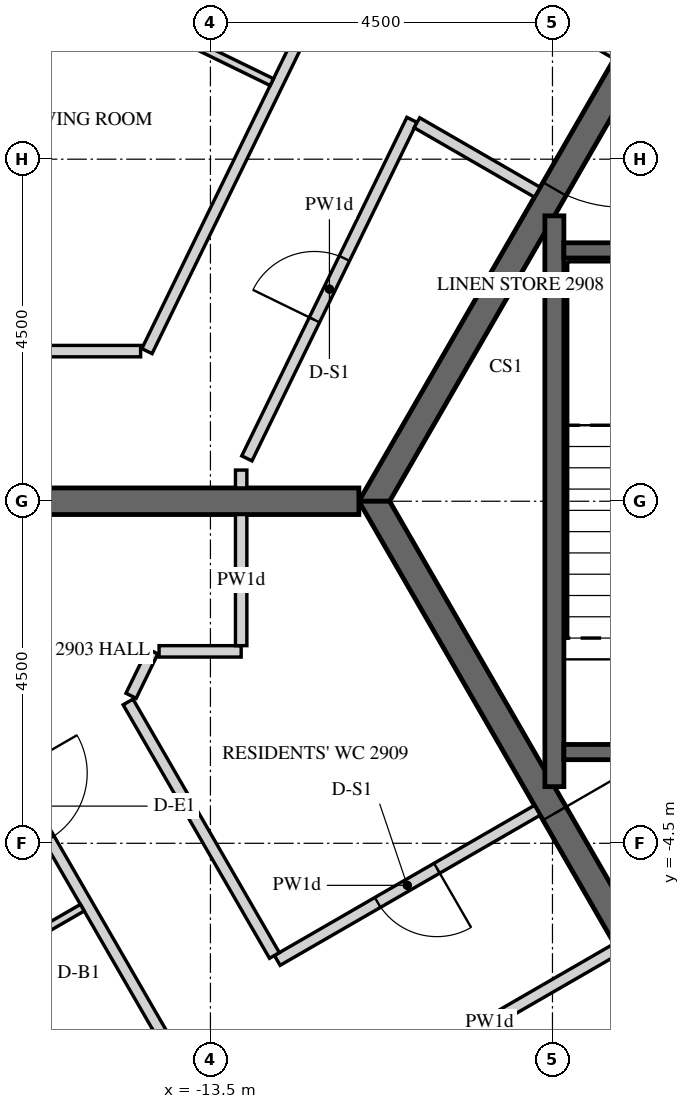
"""IFC4 building model, lengths in metres.
Left out: names, types, materials, properties, quantities, classifications, styles, units other than length and angle.
Written with IfcOpenShell. Run it as: python <this file> out.ifc"""

import sys

from ifc_helpers import new_model, si_unit, direction, frame, frame_2d, origin, place, context, subcontext, project, spatial, polyline, rectangle, outline, extrude, element, fill, save


model = new_model("IFC4")
c1 = context("Model", 3, precision=1e-05, world=origin(), true_north=direction((0.0, 1.0)))
c2 = subcontext(c1, "Body", "Model", "MODEL_VIEW")
j1 = project(units=[si_unit("LENGTHUNIT", "METRE"), si_unit("PLANEANGLEUNIT", "RADIAN")], contexts=[c1])
p1 = place(None, origin())
s1 = spatial("IfcSite", under=j1, at=p1, CompositionType="ELEMENT")
p2 = place(p1, origin())
s2 = spatial("IfcBuilding", under=s1, at=p2, CompositionType="ELEMENT")
p3 = place(p2, frame((0.0, 0.0, 372.9)))
s3 = spatial("IfcBuildingStorey", under=s2, at=p3, CompositionType="ELEMENT", Elevation=372.9)
p4 = place(p3, frame((-14.619, 19.699, -0.15), z_axis=(0.0, 0.0, 1.0), x_axis=(-0.438373747484, -0.898792777851, 0.0)))
e1 = element("IfcWall", 1, at=p4, inside=s3, PredefinedType="SOLIDWALL", context=c2, shape_type="SweptSolid", body=[
    extrude(outline(polyline([(0.225, -0.225), (20.506, -0.225), (20.957, 0.225), (-0.225, 0.225), (0.225, -0.225)])), origin(), (0.0, 0.0, 1.0), 3.55),
])
p5 = place(p4, frame((0.325, 0.0, 1.05)))
e2 = element("IfcOpeningElement", 2, at=p5, cuts=e1, PredefinedType="OPENING", context=c2, shape_type="SweptSolid", body=[
    extrude(rectangle(XDim=0.9, YDim=1.5, at=frame_2d((0.45, 0.75))), frame((0.0, 0.235, 0.0), z_axis=(0.0, -1.0, 0.0), x_axis=(1.0, 0.0, 0.0)), (0.0, 0.0, 1.0), 0.47),
])
p6 = place(p4, frame((1.525, 0.0, 0.15)))
e3 = element("IfcOpeningElement", 3, at=p6, cuts=e1, PredefinedType="OPENING", context=c2, shape_type="SweptSolid", body=[
    extrude(rectangle(XDim=1.2, YDim=2.4, at=frame_2d((0.6, 1.2))), frame((0.0, 0.235, 0.0), z_axis=(0.0, -1.0, 0.0), x_axis=(1.0, 0.0, 0.0)), (0.0, 0.0, 1.0), 0.47),
])
p7 = place(p4, frame((3.766, 0.0, 1.05)))
e4 = element("IfcOpeningElement", 4, at=p7, cuts=e1, PredefinedType="OPENING", context=c2, shape_type="SweptSolid", body=[
    extrude(rectangle(XDim=0.9, YDim=1.5, at=frame_2d((0.45, 0.75))), frame((0.0, 0.235, 0.0), z_axis=(0.0, -1.0, 0.0), x_axis=(1.0, 0.0, 0.0)), (0.0, 0.0, 1.0), 0.47),
])
p8 = place(p4, frame((4.966, 0.0, 0.15)))
e5 = element("IfcOpeningElement", 5, at=p8, cuts=e1, PredefinedType="OPENING", context=c2, shape_type="SweptSolid", body=[
    extrude(rectangle(XDim=1.2, YDim=2.4, at=frame_2d((0.6, 1.2))), frame((0.0, 0.235, 0.0), z_axis=(0.0, -1.0, 0.0), x_axis=(1.0, 0.0, 0.0)), (0.0, 0.0, 1.0), 0.47),
])
p9 = place(p4, frame((7.366, 0.0, 1.05)))
e6 = element("IfcOpeningElement", 6, at=p9, cuts=e1, PredefinedType="OPENING", context=c2, shape_type="SweptSolid", body=[
    extrude(rectangle(XDim=0.9, YDim=1.5, at=frame_2d((0.45, 0.75))), frame((0.0, 0.235, 0.0), z_axis=(0.0, -1.0, 0.0), x_axis=(1.0, 0.0, 0.0)), (0.0, 0.0, 1.0), 0.47),
])
p10 = place(p4, frame((8.566, 0.0, 0.15)))
e7 = element("IfcOpeningElement", 7, at=p10, cuts=e1, PredefinedType="OPENING", context=c2, shape_type="SweptSolid", body=[
    extrude(rectangle(XDim=1.2, YDim=2.4, at=frame_2d((0.6, 1.2))), frame((0.0, 0.235, 0.0), z_axis=(0.0, -1.0, 0.0), x_axis=(1.0, 0.0, 0.0)), (0.0, 0.0, 1.0), 0.47),
])
p11 = place(p4, frame((10.966, 0.0, 1.05)))
e8 = element("IfcOpeningElement", 8, at=p11, cuts=e1, PredefinedType="OPENING", context=c2, shape_type="SweptSolid", body=[
    extrude(rectangle(XDim=0.9, YDim=1.5, at=frame_2d((0.45, 0.75))), frame((0.0, 0.235, 0.0), z_axis=(0.0, -1.0, 0.0), x_axis=(1.0, 0.0, 0.0)), (0.0, 0.0, 1.0), 0.47),
])
p12 = place(p4, frame((12.166, 0.0, 0.15)))
e9 = element("IfcOpeningElement", 9, at=p12, cuts=e1, PredefinedType="OPENING", context=c2, shape_type="SweptSolid", body=[
    extrude(rectangle(XDim=1.2, YDim=2.4, at=frame_2d((0.6, 1.2))), frame((0.0, 0.235, 0.0), z_axis=(0.0, -1.0, 0.0), x_axis=(1.0, 0.0, 0.0)), (0.0, 0.0, 1.0), 0.47),
])
p13 = place(p4, frame((14.566, 0.0, 1.05)))
e10 = element("IfcOpeningElement", 10, at=p13, cuts=e1, PredefinedType="OPENING", context=c2, shape_type="SweptSolid", body=[
    extrude(rectangle(XDim=0.9, YDim=1.5, at=frame_2d((0.45, 0.75))), frame((0.0, 0.235, 0.0), z_axis=(0.0, -1.0, 0.0), x_axis=(1.0, 0.0, 0.0)), (0.0, 0.0, 1.0), 0.47),
])
p14 = place(p4, frame((15.766, 0.0, 0.15)))
e11 = element("IfcOpeningElement", 11, at=p14, cuts=e1, PredefinedType="OPENING", context=c2, shape_type="SweptSolid", body=[
    extrude(rectangle(XDim=1.2, YDim=2.4, at=frame_2d((0.6, 1.2))), frame((0.0, 0.235, 0.0), z_axis=(0.0, -1.0, 0.0), x_axis=(1.0, 0.0, 0.0)), (0.0, 0.0, 1.0), 0.47),
])
p15 = place(p4, frame((18.007, 0.0, 1.05)))
e12 = element("IfcOpeningElement", 12, at=p15, cuts=e1, PredefinedType="OPENING", context=c2, shape_type="SweptSolid", body=[
    extrude(rectangle(XDim=0.9, YDim=1.5, at=frame_2d((0.45, 0.75))), frame((0.0, 0.235, 0.0), z_axis=(0.0, -1.0, 0.0), x_axis=(1.0, 0.0, 0.0)), (0.0, 0.0, 1.0), 0.47),
])
p16 = place(p4, frame((19.207, 0.0, 0.15)))
e13 = element("IfcOpeningElement", 13, at=p16, cuts=e1, PredefinedType="OPENING", context=c2, shape_type="SweptSolid", body=[
    extrude(rectangle(XDim=1.2, YDim=2.4, at=frame_2d((0.6, 1.2))), frame((0.0, 0.235, 0.0), z_axis=(0.0, -1.0, 0.0), x_axis=(1.0, 0.0, 0.0)), (0.0, 0.0, 1.0), 0.47),
])
p17 = place(p3, frame((-25.907, -2.678, -0.15), z_axis=(0.0, 0.0, 1.0), x_axis=(0.499997453958, -0.866026873738, 0.0)))
e14 = element("IfcWall", 14, at=p17, inside=s3, PredefinedType="SOLIDWALL", context=c2, shape_type="SweptSolid", body=[
    extrude(outline(polyline([(-0.018, -0.225), (23.152, -0.225), (23.11, 0.225), (0.018, 0.225), (-0.018, -0.225)])), origin(), (0.0, 0.0, 1.0), 3.55),
])
p18 = place(p17, frame((1.366, 0.0, 0.45)))
e15 = element("IfcOpeningElement", 15, at=p18, cuts=e14, PredefinedType="OPENING", context=c2, shape_type="SweptSolid", body=[
    extrude(rectangle(XDim=2.4, YDim=3.0, at=frame_2d((1.2, 1.5))), frame((0.0, 0.235, 0.0), z_axis=(0.0, -1.0, 0.0), x_axis=(1.0, 0.0, 0.0)), (0.0, 0.0, 1.0), 0.47),
])
p19 = place(p17, frame((4.966, 0.0, 0.45)))
e16 = element("IfcOpeningElement", 16, at=p19, cuts=e14, PredefinedType="OPENING", context=c2, shape_type="SweptSolid", body=[
    extrude(rectangle(XDim=2.4, YDim=3.0, at=frame_2d((1.2, 1.5))), frame((0.0, 0.235, 0.0), z_axis=(0.0, -1.0, 0.0), x_axis=(1.0, 0.0, 0.0)), (0.0, 0.0, 1.0), 0.47),
])
p20 = place(p17, frame((8.566, 0.0, 0.45)))
e17 = element("IfcOpeningElement", 17, at=p20, cuts=e14, PredefinedType="OPENING", context=c2, shape_type="SweptSolid", body=[
    extrude(rectangle(XDim=2.4, YDim=3.0, at=frame_2d((1.2, 1.5))), frame((0.0, 0.235, 0.0), z_axis=(0.0, -1.0, 0.0), x_axis=(1.0, 0.0, 0.0)), (0.0, 0.0, 1.0), 0.47),
])
p21 = place(p17, frame((12.166, 0.0, 0.45)))
e18 = element("IfcOpeningElement", 18, at=p21, cuts=e14, PredefinedType="OPENING", context=c2, shape_type="SweptSolid", body=[
    extrude(rectangle(XDim=2.4, YDim=3.0, at=frame_2d((1.2, 1.5))), frame((0.0, 0.235, 0.0), z_axis=(0.0, -1.0, 0.0), x_axis=(1.0, 0.0, 0.0)), (0.0, 0.0, 1.0), 0.47),
])
p22 = place(p17, frame((15.766, 0.0, 0.45)))
e19 = element("IfcOpeningElement", 19, at=p22, cuts=e14, PredefinedType="OPENING", context=c2, shape_type="SweptSolid", body=[
    extrude(rectangle(XDim=2.4, YDim=3.0, at=frame_2d((1.2, 1.5))), frame((0.0, 0.235, 0.0), z_axis=(0.0, -1.0, 0.0), x_axis=(1.0, 0.0, 0.0)), (0.0, 0.0, 1.0), 0.47),
])
p23 = place(p17, frame((19.366, 0.0, 0.45)))
e20 = element("IfcOpeningElement", 20, at=p23, cuts=e14, PredefinedType="OPENING", context=c2, shape_type="SweptSolid", body=[
    extrude(rectangle(XDim=2.4, YDim=3.0, at=frame_2d((1.2, 1.5))), frame((0.0, 0.235, 0.0), z_axis=(0.0, -1.0, 0.0), x_axis=(1.0, 0.0, 0.0)), (0.0, 0.0, 1.0), 0.47),
])
p24 = place(p3, frame((-5.673, 9.825, -0.15), z_axis=(0.0, 0.0, 1.0), x_axis=(-0.499995046907, -0.866028263435, 0.0)))
e21 = element("IfcWall", 21, at=p24, inside=s3, PredefinedType="SHEAR", context=c2, shape_type="SweptSolid", body=[
    extrude(outline(polyline([(-0.101, -0.175), (11.446, -0.175), (11.244, 0.175), (0.101, 0.175), (-0.101, -0.175)])), origin(), (0.0, 0.0, 1.0), 3.55),
])
p25 = place(p24, frame((4.801, 0.0, 0.15)))
e22 = element("IfcOpeningElement", 22, at=p25, cuts=e21, PredefinedType="OPENING", context=c2, shape_type="SweptSolid", body=[
    extrude(rectangle(XDim=1.8, YDim=2.4, at=frame_2d((0.9, 1.2))), frame((0.0, 0.185, 0.0), z_axis=(0.0, -1.0, 0.0), x_axis=(1.0, 0.0, 0.0)), (0.0, 0.0, 1.0), 0.37),
])
p26 = place(p3, frame((-11.345, 0.0, -0.15), z_axis=(0.0, 0.0, 1.0), x_axis=(0.499995046907, -0.866028263435, 0.0)))
e23 = element("IfcWall", 23, at=p26, inside=s3, PredefinedType="SHEAR", context=c2, shape_type="SweptSolid", body=[
    extrude(outline(polyline([(-0.101, -0.175), (11.446, -0.175), (11.244, 0.175), (0.101, 0.175), (-0.101, -0.175)])), origin(), (0.0, 0.0, 1.0), 3.55),
])
p27 = place(p26, frame((4.744, 0.0, 0.15)))
e24 = element("IfcOpeningElement", 24, at=p27, cuts=e23, PredefinedType="OPENING", context=c2, shape_type="SweptSolid", body=[
    extrude(rectangle(XDim=1.8, YDim=2.4, at=frame_2d((0.9, 1.2))), frame((0.0, 0.185, 0.0), z_axis=(0.0, -1.0, 0.0), x_axis=(1.0, 0.0, 0.0)), (0.0, 0.0, 1.0), 0.37),
])
p28 = place(p3, frame((-11.547, 0.0, -0.15), z_axis=(0.0, 0.0, 1.0), x_axis=(-1.0, 0.0, 0.0)))
e25 = element("IfcWall", 25, at=p28, inside=s3, PredefinedType="SHEAR", context=c2, shape_type="SweptSolid", body=[
    extrude(rectangle(XDim=14.51, YDim=0.35, at=frame_2d((7.255, 0.0))), origin(), (0.0, 0.0, 1.0), 3.55),
])
p29 = place(p28, frame((6.355, 0.0, 0.15)))
e26 = element("IfcOpeningElement", 26, at=p29, cuts=e25, PredefinedType="OPENING", context=c2, shape_type="SweptSolid", body=[
    extrude(rectangle(XDim=1.8, YDim=2.4, at=frame_2d((0.9, 1.2))), frame((0.0, 0.185, 0.0), z_axis=(0.0, -1.0, 0.0), x_axis=(1.0, 0.0, 0.0)), (0.0, 0.0, 1.0), 0.37),
])
p30 = place(p3, frame((-8.975, -3.755, -0.25), z_axis=(0.0, 0.0, 1.0), x_axis=(0.0, 1.0, 0.0)))
e27 = element("IfcWall", 27, at=p30, inside=s3, PredefinedType="SHEAR", context=c2, shape_type="SweptSolid", body=[
    extrude(rectangle(XDim=7.51, YDim=0.25, at=frame_2d((3.755, 0.0))), origin(), (0.0, 0.0, 1.0), 3.9),
])
p31 = place(p3, frame((-8.85, 3.3, -0.25), z_axis=(0.0, 0.0, 1.0), x_axis=(1.0, 0.0, 0.0)))
e28 = element("IfcWall", 28, at=p31, inside=s3, PredefinedType="SHEAR", context=c2, shape_type="SweptSolid", body=[
    extrude(rectangle(XDim=2.95, YDim=0.2, at=frame_2d((1.475, 0.0))), origin(), (0.0, 0.0, 1.0), 3.9),
])
p32 = place(p3, frame((-8.85, -3.3, -0.25), z_axis=(0.0, 0.0, 1.0), x_axis=(1.0, 0.0, 0.0)))
e29 = element("IfcWall", 29, at=p32, inside=s3, PredefinedType="SHEAR", context=c2, shape_type="SweptSolid", body=[
    extrude(rectangle(XDim=2.95, YDim=0.2, at=frame_2d((1.475, 0.0))), origin(), (0.0, 0.0, 1.0), 3.9),
])
p33 = place(p32, frame((0.875, 0.0, 0.25)))
e30 = element("IfcOpeningElement", 30, at=p33, cuts=e29, PredefinedType="OPENING", context=c2, shape_type="SweptSolid", body=[
    extrude(rectangle(XDim=1.2, YDim=2.4, at=frame_2d((0.6, 1.2))), frame((0.0, 0.11, 0.0), z_axis=(0.0, -1.0, 0.0), x_axis=(1.0, 0.0, 0.0)), (0.0, 0.0, 1.0), 0.22),
])
p34 = place(p3, frame((-7.653, 15.675, 0.0), z_axis=(0.0, 0.0, 1.0), x_axis=(-0.438369669055, -0.898794767037, 0.0)))
e31 = element("IfcWall", 31, at=p34, inside=s3, PredefinedType="PARTITIONING", context=c2, shape_type="SweptSolid", body=[
    extrude(rectangle(XDim=15.243, YDim=0.15, at=frame_2d((7.621, 0.0))), origin(), (0.0, 0.0, 1.0), 2.47),
])
p35 = place(p34, frame((2.942, 0.0, 0.0)))
e32 = element("IfcOpeningElement", 32, at=p35, cuts=e31, PredefinedType="OPENING", context=c2, shape_type="SweptSolid", body=[
    extrude(rectangle(XDim=1.0, YDim=2.1, at=frame_2d((0.5, 1.05))), frame((0.0, 0.085, 0.0), z_axis=(0.0, -1.0, 0.0), x_axis=(1.0, 0.0, 0.0)), (0.0, 0.0, 1.0), 0.17),
])
p36 = place(p3, frame((-14.418, 1.975, 0.0), z_axis=(0.0, 0.0, 1.0), x_axis=(-1.0, 0.0, 0.0)))
e33 = element("IfcWall", 33, at=p36, inside=s3, PredefinedType="PARTITIONING", context=c2, shape_type="SweptSolid", body=[
    extrude(rectangle(XDim=5.784, YDim=0.15, at=frame_2d((2.892, 0.0))), origin(), (0.0, 0.0, 1.0), 2.47),
])
p37 = place(p3, frame((-8.15, 5.884, 0.0), z_axis=(0.0, 0.0, 1.0), x_axis=(-0.866007146345, 0.50003162148, 0.0)))
e34 = element("IfcWall", 34, at=p37, inside=s3, PredefinedType="PARTITIONING", context=c2, shape_type="SweptSolid", body=[
    extrude(rectangle(XDim=2.051, YDim=0.15, at=frame_2d((1.025, 0.0))), origin(), (0.0, 0.0, 1.0), 2.47),
])
p38 = place(p3, frame((-13.096, 0.175, 0.0), z_axis=(0.0, 0.0, 1.0), x_axis=(0.0, 1.0, 0.0)))
e35 = element("IfcWall", 35, at=p38, inside=s3, PredefinedType="PARTITIONING", context=c2, shape_type="SweptSolid", body=[
    extrude(rectangle(XDim=0.235, YDim=0.15, at=frame_2d((0.118, 0.0))), origin(), (0.0, 0.0, 1.0), 2.47),
])
p39 = place(p3, frame((-13.021, 0.564, 0.0), z_axis=(0.0, 0.0, 1.0), x_axis=(0.438343062662, 0.8988077433, 0.0)))
e36 = element("IfcWall", 36, at=p39, inside=s3, PredefinedType="PARTITIONING", context=c2, shape_type="SweptSolid", body=[
    extrude(rectangle(XDim=4.955, YDim=0.15, at=frame_2d((2.478, 0.0))), origin(), (0.0, 0.0, 1.0), 2.47),
])
p40 = place(p39, frame((2.028, 0.0, 0.0)))
e37 = element("IfcOpeningElement", 37, at=p40, cuts=e36, PredefinedType="OPENING", context=c2, shape_type="SweptSolid", body=[
    extrude(rectangle(XDim=0.9, YDim=2.1, at=frame_2d((0.45, 1.05))), frame((0.0, 0.085, 0.0), z_axis=(0.0, -1.0, 0.0), x_axis=(1.0, 0.0, 0.0)), (0.0, 0.0, 1.0), 0.17),
])
p41 = place(p3, frame((-10.783, 4.98, 0.0), z_axis=(0.0, 0.0, 1.0), x_axis=(0.866007702746, -0.500030657845, 0.0)))
e38 = element("IfcWall", 38, at=p41, inside=s3, PredefinedType="PARTITIONING", context=c2, shape_type="SweptSolid", body=[
    extrude(rectangle(XDim=1.829, YDim=0.15, at=frame_2d((0.914, 0.0))), origin(), (0.0, 0.0, 1.0), 2.47),
])
p42 = place(p3, frame((-16.583, -2.777, 0.0), z_axis=(0.0, 0.0, 1.0), x_axis=(0.50000467473, -0.866022704811, 0.0)))
e39 = element("IfcWall", 39, at=p42, inside=s3, PredefinedType="PARTITIONING", context=c2, shape_type="SweptSolid", body=[
    extrude(rectangle(XDim=13.504, YDim=0.15, at=frame_2d((6.752, 0.0))), origin(), (0.0, 0.0, 1.0), 2.47),
])
p43 = place(p42, frame((0.925, 0.0, 0.0)))
e40 = element("IfcOpeningElement", 40, at=p43, cuts=e39, PredefinedType="OPENING", context=c2, shape_type="SweptSolid", body=[
    extrude(rectangle(XDim=1.0, YDim=2.1, at=frame_2d((0.5, 1.05))), frame((0.0, 0.085, 0.0), z_axis=(0.0, -1.0, 0.0), x_axis=(1.0, 0.0, 0.0)), (0.0, 0.0, 1.0), 0.17),
])
p44 = place(p3, frame((-9.2, -4.066, 0.0), z_axis=(0.0, 0.0, 1.0), x_axis=(-0.866020906874, -0.500007788796, 0.0)))
e41 = element("IfcWall", 41, at=p44, inside=s3, PredefinedType="PARTITIONING", context=c2, shape_type="SweptSolid", body=[
    extrude(rectangle(XDim=3.95, YDim=0.15, at=frame_2d((1.975, 0.0))), origin(), (0.0, 0.0, 1.0), 2.47),
])
p45 = place(p44, frame((1.525, 0.0, 0.0)))
e42 = element("IfcOpeningElement", 42, at=p45, cuts=e41, PredefinedType="OPENING", context=c2, shape_type="SweptSolid", body=[
    extrude(rectangle(XDim=0.9, YDim=2.1, at=frame_2d((0.45, 1.05))), frame((0.0, 0.085, 0.0), z_axis=(0.0, -1.0, 0.0), x_axis=(1.0, 0.0, 0.0)), (0.0, 0.0, 1.0), 0.17),
])
p46 = place(p3, frame((-12.658, -5.976, 0.0), z_axis=(0.0, 0.0, 1.0), x_axis=(-0.499991345342, 0.866030400496, 0.0)))
e43 = element("IfcWall", 43, at=p46, inside=s3, PredefinedType="PARTITIONING", context=c2, shape_type="SweptSolid", body=[
    extrude(rectangle(XDim=3.851, YDim=0.15, at=frame_2d((1.926, 0.0))), origin(), (0.0, 0.0, 1.0), 2.47),
])
p47 = place(p3, frame((-14.544, -2.559, 0.0), z_axis=(0.0, 0.0, 1.0), x_axis=(0.438630789999, 0.898667363414, 0.0)))
e44 = element("IfcWall", 44, at=p47, inside=s3, PredefinedType="PARTITIONING", context=c2, shape_type="SweptSolid", body=[
    extrude(rectangle(XDim=0.65, YDim=0.15, at=frame_2d((0.325, 0.0))), origin(), (0.0, 0.0, 1.0), 2.47),
])
p48 = place(p3, frame((-14.176, -1.975, 0.0), z_axis=(0.0, 0.0, 1.0), x_axis=(1.0, 0.0, 0.0)))
e45 = element("IfcWall", 45, at=p48, inside=s3, PredefinedType="PARTITIONING", context=c2, shape_type="SweptSolid", body=[
    extrude(rectangle(XDim=1.08, YDim=0.15, at=frame_2d((0.54, 0.0))), origin(), (0.0, 0.0, 1.0), 2.47),
])
p49 = place(p3, frame((-13.096, -1.9, 0.0), z_axis=(0.0, 0.0, 1.0), x_axis=(0.0, 1.0, 0.0)))
e46 = element("IfcWall", 46, at=p49, inside=s3, PredefinedType="PARTITIONING", context=c2, shape_type="SweptSolid", body=[
    extrude(rectangle(XDim=1.725, YDim=0.15, at=frame_2d((0.862, 0.0))), origin(), (0.0, 0.0, 1.0), 2.47),
])
p50 = place(p3, frame((-11.506, -7.822, 0.0), z_axis=(0.0, 0.0, 1.0), x_axis=(0.866032409438, 0.499987865656, 0.0)))
e47 = element("IfcWall", 47, at=p50, inside=s3, PredefinedType="PARTITIONING", context=c2, shape_type="SweptSolid", body=[
    extrude(rectangle(XDim=3.875, YDim=0.15, at=frame_2d((1.938, 0.0))), origin(), (0.0, 0.0, 1.0), 2.47),
])
p51 = place(p3, frame((-12.692, 5.514, 0.0), z_axis=(0.0, 0.0, 1.0), x_axis=(-0.898787574002, 0.438384416717, 0.0)))
e48 = element("IfcWall", 48, at=p51, inside=s3, PredefinedType="PARTITIONING", context=c2, shape_type="SweptSolid", body=[
    extrude(rectangle(XDim=3.925, YDim=0.1, at=frame_2d((1.962, 0.0))), origin(), (0.0, 0.0, 1.0), 2.47),
])
p52 = place(p3, frame((-18.239, -7.11, 0.0), z_axis=(0.0, 0.0, 1.0), x_axis=(0.866031034943, 0.499990246421, 0.0)))
e49 = element("IfcWall", 49, at=p52, inside=s3, PredefinedType="PARTITIONING", context=c2, shape_type="SweptSolid", body=[
    extrude(rectangle(XDim=3.525, YDim=0.1, at=frame_2d((1.762, 0.0))), origin(), (0.0, 0.0, 1.0), 2.47),
])
p53 = place(p52, frame((1.4, 0.0, 0.0)))
e50 = element("IfcOpeningElement", 50, at=p53, cuts=e49, PredefinedType="OPENING", context=c2, shape_type="SweptSolid", body=[
    extrude(rectangle(XDim=0.8, YDim=2.1, at=frame_2d((0.4, 1.05))), frame((0.0, 0.06, 0.0), z_axis=(0.0, -1.0, 0.0), x_axis=(1.0, 0.0, 0.0)), (0.0, 0.0, 1.0), 0.12),
])
p54 = place(p25, origin())
e51 = element("IfcDoor", 51, at=p54, inside=s3, OperationType="DOUBLE_DOOR_SINGLE_SWING", PredefinedType="DOOR", context=c2, shape_type="SweptSolid", body=[
    extrude(rectangle(XDim=1.8, YDim=2.4, at=frame_2d((0.9, 1.2))), frame((0.0, 0.025, 0.0), z_axis=(0.0, -1.0, 0.0), x_axis=(1.0, 0.0, 0.0)), (0.0, 0.0, 1.0), 0.05),
])
fill(e22, e51)
p55 = place(p27, origin())
e52 = element("IfcDoor", 52, at=p55, inside=s3, OperationType="DOUBLE_DOOR_SINGLE_SWING", PredefinedType="DOOR", context=c2, shape_type="SweptSolid", body=[
    extrude(rectangle(XDim=1.8, YDim=2.4, at=frame_2d((0.9, 1.2))), frame((0.0, 0.025, 0.0), z_axis=(0.0, -1.0, 0.0), x_axis=(1.0, 0.0, 0.0)), (0.0, 0.0, 1.0), 0.05),
])
fill(e24, e52)
p56 = place(p40, origin())
e53 = element("IfcDoor", 53, at=p56, inside=s3, OperationType="SINGLE_SWING_LEFT", PredefinedType="DOOR", context=c2, shape_type="SweptSolid", body=[
    extrude(rectangle(XDim=0.9, YDim=2.1, at=frame_2d((0.45, 1.05))), frame((0.0, 0.025, 0.0), z_axis=(0.0, -1.0, 0.0), x_axis=(1.0, 0.0, 0.0)), (0.0, 0.0, 1.0), 0.05),
])
fill(e37, e53)
p57 = place(p45, origin())
e54 = element("IfcDoor", 54, at=p57, inside=s3, OperationType="SINGLE_SWING_LEFT", PredefinedType="DOOR", context=c2, shape_type="SweptSolid", body=[
    extrude(rectangle(XDim=0.9, YDim=2.1, at=frame_2d((0.45, 1.05))), frame((0.0, 0.025, 0.0), z_axis=(0.0, -1.0, 0.0), x_axis=(1.0, 0.0, 0.0)), (0.0, 0.0, 1.0), 0.05),
])
fill(e42, e54)
save(model, sys.argv[1])
